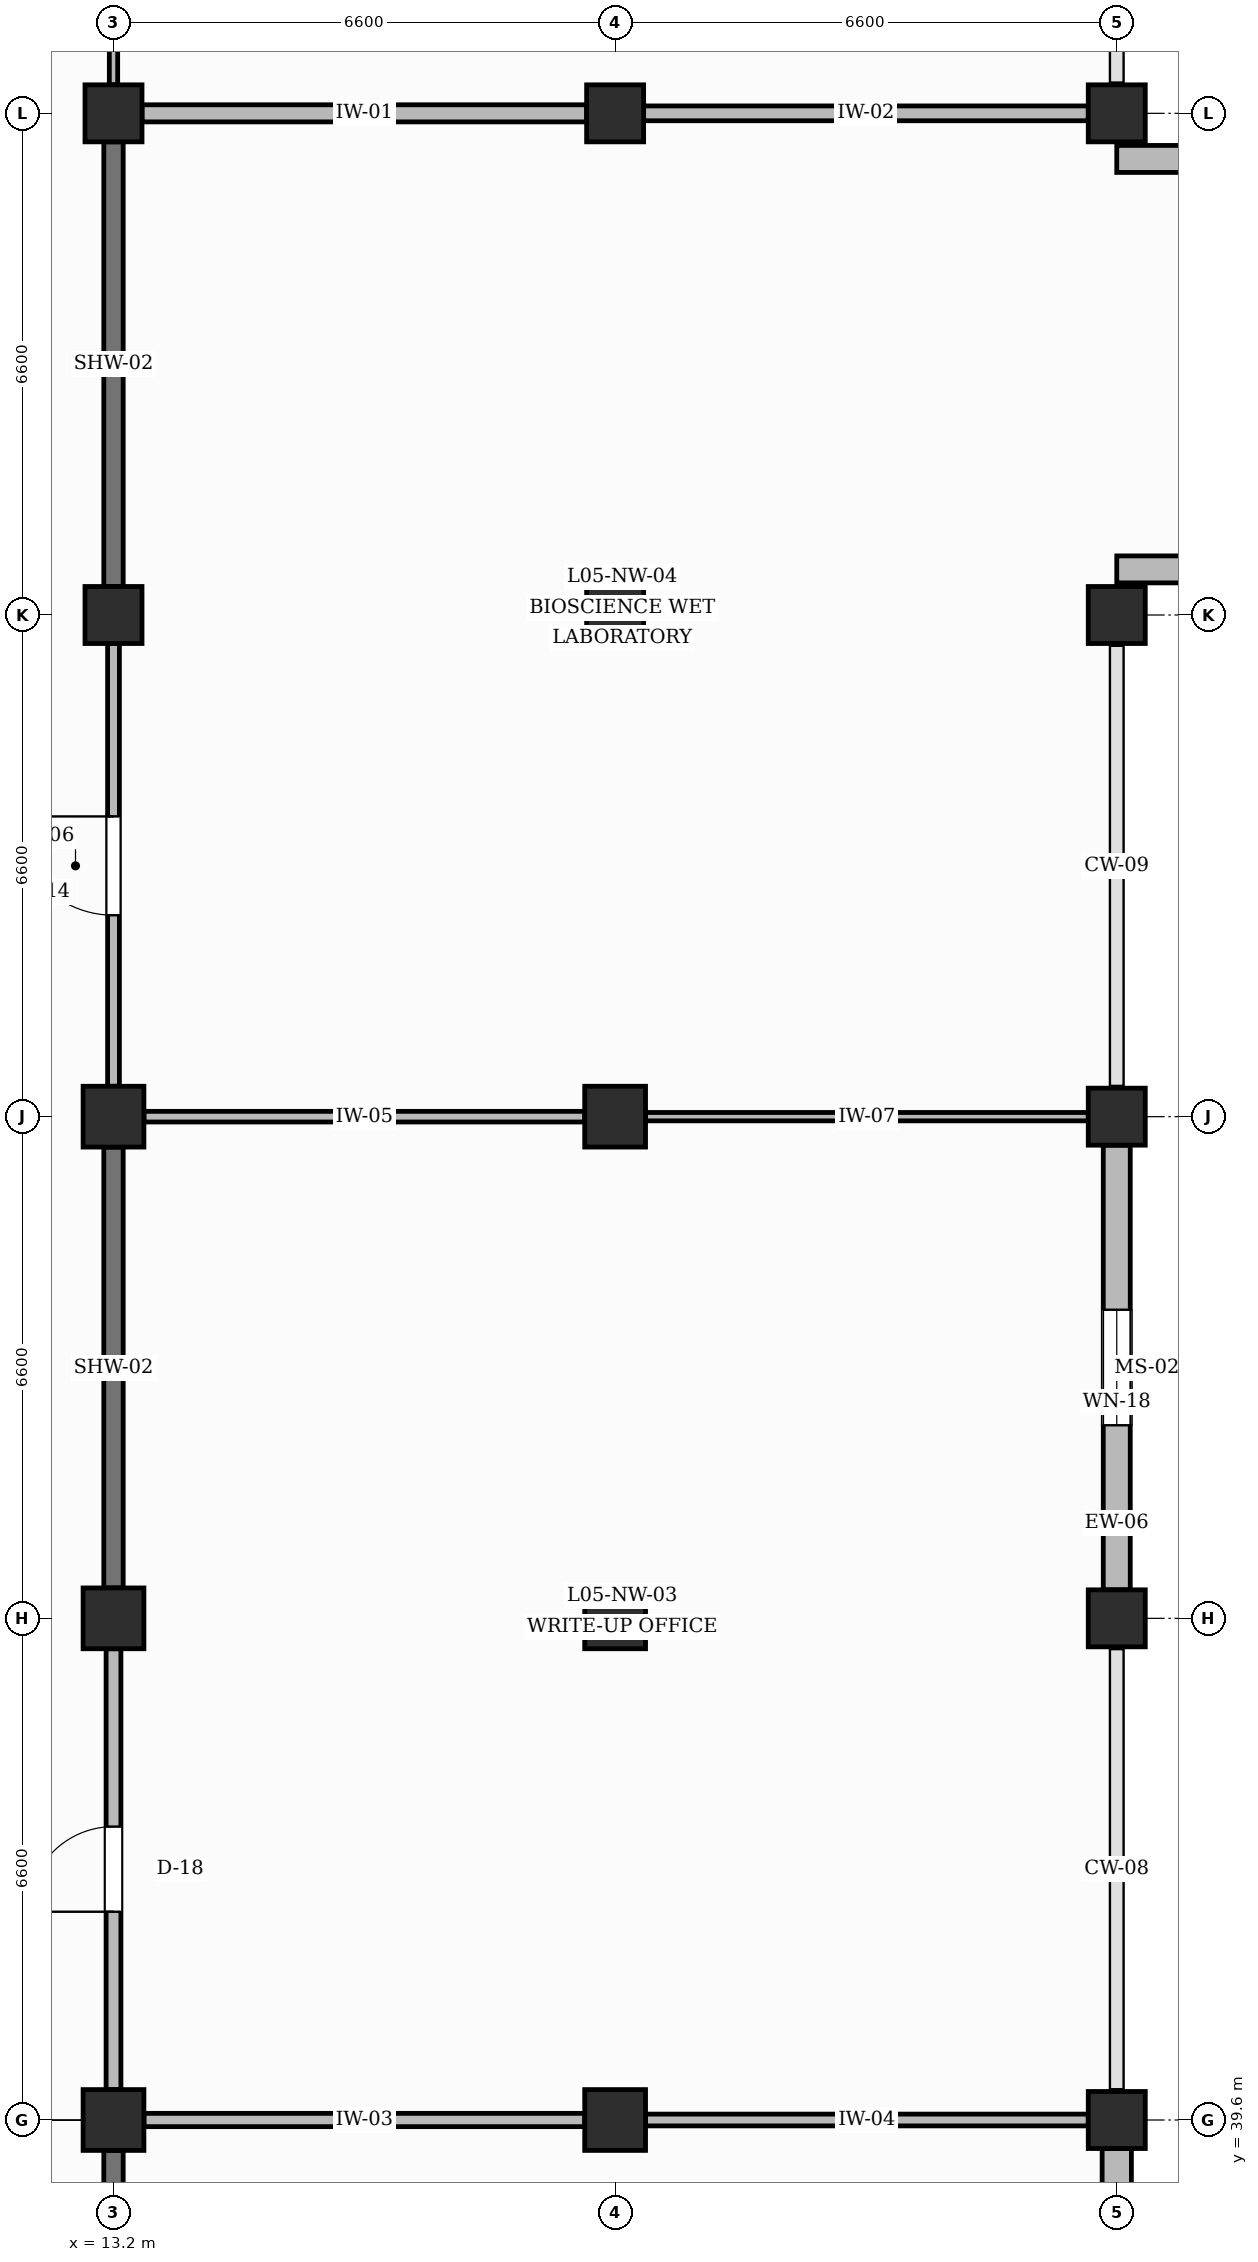
"""IFC4 building model, lengths in metres.
Left out: names, types, materials, properties, quantities, classifications, styles, units other than length and angle.
Written with IfcOpenShell. Run it as: python <this file> out.ifc"""

import sys

from ifc_helpers import new_model, si_unit, direction, frame, frame_2d, origin, origin_2d, place, context, subcontext, project, spatial, rectangle, extrude, element, fill, save


model = new_model("IFC4")
c1 = context("Model", 3, precision=1e-05, world=origin(), true_north=direction((0.0, 1.0)))
c2 = subcontext(c1, "Body", "Model", "MODEL_VIEW")
j1 = project(units=[si_unit("LENGTHUNIT", "METRE"), si_unit("PLANEANGLEUNIT", "RADIAN")], contexts=[c1])
p1 = place(None, origin())
s1 = spatial("IfcSite", under=j1, at=p1, CompositionType="ELEMENT")
p2 = place(p1, origin())
s2 = spatial("IfcBuilding", under=s1, at=p2, CompositionType="ELEMENT")
p3 = place(p2, frame((0.0, 0.0, 22.8)))
s3 = spatial("IfcBuildingStorey", under=s2, at=p3, CompositionType="ELEMENT", Elevation=22.8)
for number, where, z_axis, x_axis in (
    (1, (13.2, 39.6, 0.0), (0.0, 0.0, 1.0), (1.0, 0.0, 0.0)),
    (2, (13.2, 46.2, 0.0), (0.0, 0.0, 1.0), (1.0, 0.0, 0.0)),
    (3, (13.2, 52.8, 0.0), (0.0, 0.0, 1.0), (1.0, 0.0, 0.0)),
):
    element("IfcColumn", number, at=place(p3, frame(where, z_axis=z_axis, x_axis=x_axis)), inside=s3, PredefinedType="COLUMN", context=c2, shape_type="SweptSolid", body=[
        extrude(rectangle(XDim=0.8, YDim=0.8, at=origin_2d()), origin(), (0.0, 0.0, 1.0), 4.2),
    ])
for number, where, z_axis, x_axis in (
    (4, (13.2, 59.4, 0.0), (0.0, 0.0, 1.0), (1.0, 0.0, 0.0)),
    (5, (13.2, 66.0, 0.0), (0.0, 0.0, 1.0), (1.0, 0.0, 0.0)),
):
    element("IfcColumn", number, at=place(p3, frame(where, z_axis=z_axis, x_axis=x_axis)), inside=s3, PredefinedType="COLUMN", context=c2, shape_type="SweptSolid", body=[
        extrude(rectangle(XDim=0.75, YDim=0.75, at=origin_2d()), origin(), (0.0, 0.0, 1.0), 4.2),
    ])
for number, where, z_axis, x_axis in (
    (6, (19.8, 39.6, 0.0), (0.0, 0.0, 1.0), (1.0, 0.0, 0.0)),
    (7, (19.8, 46.2, 0.0), (0.0, 0.0, 1.0), (1.0, 0.0, 0.0)),
    (8, (19.8, 52.8, 0.0), (0.0, 0.0, 1.0), (1.0, 0.0, 0.0)),
):
    element("IfcColumn", number, at=place(p3, frame(where, z_axis=z_axis, x_axis=x_axis)), inside=s3, PredefinedType="COLUMN", context=c2, shape_type="SweptSolid", body=[
        extrude(rectangle(XDim=0.8, YDim=0.8, at=origin_2d()), origin(), (0.0, 0.0, 1.0), 4.2),
    ])
for number, where, z_axis, x_axis in (
    (9, (19.8, 59.4, 0.0), (0.0, 0.0, 1.0), (1.0, 0.0, 0.0)),
    (10, (19.8, 66.0, 0.0), (0.0, 0.0, 1.0), (1.0, 0.0, 0.0)),
    (11, (26.4, 39.6, 0.0), (0.0, 0.0, 1.0), (1.0, 0.0, 0.0)),
    (12, (26.4, 46.2, 0.0), (0.0, 0.0, 1.0), (1.0, 0.0, 0.0)),
    (13, (26.4, 52.8, 0.0), (0.0, 0.0, 1.0), (1.0, 0.0, 0.0)),
    (14, (26.4, 59.4, 0.0), (0.0, 0.0, 1.0), (1.0, 0.0, 0.0)),
    (15, (26.4, 66.0, 0.0), (0.0, 0.0, 1.0), (1.0, 0.0, 0.0)),
):
    element("IfcColumn", number, at=place(p3, frame(where, z_axis=z_axis, x_axis=x_axis)), inside=s3, PredefinedType="COLUMN", context=c2, shape_type="SweptSolid", body=[
        extrude(rectangle(XDim=0.75, YDim=0.75, at=origin_2d()), origin(), (0.0, 0.0, 1.0), 4.2),
    ])
p4 = place(p3, frame((26.4, 33.375, 0.0), z_axis=(0.0, 0.0, 1.0), x_axis=(0.0, 1.0, 0.0)))
e16 = element("IfcWall", 16, at=p4, inside=s3, PredefinedType="SOLIDWALL", context=c2, shape_type="SweptSolid", body=[
    extrude(rectangle(XDim=5.85, YDim=0.385, at=frame_2d((2.925, 0.0))), origin(), (0.0, 0.0, 1.0), 3.27),
])
p5 = place(p4, frame((2.165, 0.0, 0.95)))
e17 = element("IfcOpeningElement", 17, at=p5, cuts=e16, PredefinedType="OPENING", context=c2, shape_type="SweptSolid", body=[
    extrude(rectangle(XDim=1.52, YDim=1.3, at=frame_2d((0.76, 0.65))), frame((0.0, 0.202, 0.0), z_axis=(0.0, -1.0, 0.0), x_axis=(1.0, 0.0, 0.0)), (0.0, 0.0, 1.0), 0.405),
])
p6 = place(p3, frame((26.4, 46.575, 0.0), z_axis=(0.0, 0.0, 1.0), x_axis=(0.0, 1.0, 0.0)))
e18 = element("IfcWall", 18, at=p6, inside=s3, PredefinedType="SOLIDWALL", context=c2, shape_type="SweptSolid", body=[
    extrude(rectangle(XDim=5.85, YDim=0.355, at=frame_2d((2.925, 0.0))), origin(), (0.0, 0.0, 1.0), 3.27),
])
p7 = place(p6, frame((2.165, 0.0, 0.95)))
e19 = element("IfcOpeningElement", 19, at=p7, cuts=e18, PredefinedType="OPENING", context=c2, shape_type="SweptSolid", body=[
    extrude(rectangle(XDim=1.52, YDim=1.52, at=frame_2d((0.76, 0.76))), frame((0.0, 0.188, 0.0), z_axis=(0.0, -1.0, 0.0), x_axis=(1.0, 0.0, 0.0)), (0.0, 0.0, 1.0), 0.375),
])
for number, where, z_axis, x_axis in (
    (20, (26.4, 60.0, 0.0), (0.0, 0.0, 1.0), (1.0, 0.0, 0.0)),
    (21, (26.4, 65.4, 0.0), (0.0, 0.0, 1.0), (1.0, 0.0, 0.0)),
):
    element("IfcWall", number, at=place(p3, frame(where, z_axis=z_axis, x_axis=x_axis)), inside=s3, PredefinedType="SOLIDWALL", context=c2, shape_type="SweptSolid", body=[
        extrude(rectangle(XDim=2.0, YDim=0.355, at=frame_2d((1.0, 0.0))), origin(), (0.0, 0.0, 1.0), 3.27),
    ])
p8 = place(p3, frame((13.2, 33.4, 0.0), z_axis=(0.0, 0.0, 1.0), x_axis=(0.0, 1.0, 0.0)))
e22 = element("IfcWall", 22, at=p8, inside=s3, PredefinedType="SHEAR", context=c2, shape_type="SweptSolid", body=[
    extrude(rectangle(XDim=5.8, YDim=0.255, at=frame_2d((2.9, 0.0))), origin(), (0.0, 0.0, 1.0), 3.17),
])
p9 = place(p3, frame((13.2, 40.0, 0.0), z_axis=(0.0, 0.0, 1.0), x_axis=(0.0, 1.0, 0.0)))
e23 = element("IfcWall", 23, at=p9, inside=s3, PredefinedType="PARTITIONING", context=c2, shape_type="SweptSolid", body=[
    extrude(rectangle(XDim=5.8, YDim=0.195, at=frame_2d((2.9, 0.0))), origin(), (0.0, 0.0, 1.0), 3.17),
])
p10 = place(p9, frame((2.34, 0.0, 0.0)))
e24 = element("IfcOpeningElement", 24, at=p10, cuts=e23, PredefinedType="OPENING", context=c2, shape_type="SweptSolid", body=[
    extrude(rectangle(XDim=1.12, YDim=2.2, at=frame_2d((0.56, 1.1))), frame((0.0, 0.107, 0.0), z_axis=(0.0, -1.0, 0.0), x_axis=(1.0, 0.0, 0.0)), (0.0, 0.0, 1.0), 0.215),
])
p11 = place(p3, frame((13.2, 46.6, 0.0), z_axis=(0.0, 0.0, 1.0), x_axis=(0.0, 1.0, 0.0)))
e25 = element("IfcWall", 25, at=p11, inside=s3, PredefinedType="SHEAR", context=c2, shape_type="SweptSolid", body=[
    extrude(rectangle(XDim=5.8, YDim=0.255, at=frame_2d((2.9, 0.0))), origin(), (0.0, 0.0, 1.0), 3.17),
])
p12 = place(p3, frame((13.2, 53.2, 0.0), z_axis=(0.0, 0.0, 1.0), x_axis=(0.0, 1.0, 0.0)))
e26 = element("IfcWall", 26, at=p12, inside=s3, PredefinedType="PARTITIONING", context=c2, shape_type="SweptSolid", body=[
    extrude(rectangle(XDim=5.825, YDim=0.155, at=frame_2d((2.913, 0.0))), origin(), (0.0, 0.0, 1.0), 3.17),
])
p13 = place(p12, frame((2.25, 0.0, 0.0)))
e27 = element("IfcOpeningElement", 27, at=p13, cuts=e26, PredefinedType="OPENING", context=c2, shape_type="SweptSolid", body=[
    extrude(rectangle(XDim=1.3, YDim=2.3, at=frame_2d((0.65, 1.15))), frame((0.0, 0.087, 0.0), z_axis=(0.0, -1.0, 0.0), x_axis=(1.0, 0.0, 0.0)), (0.0, 0.0, 1.0), 0.175),
])
p14 = place(p3, frame((13.2, 59.775, 0.0), z_axis=(0.0, 0.0, 1.0), x_axis=(0.0, 1.0, 0.0)))
e28 = element("IfcWall", 28, at=p14, inside=s3, PredefinedType="SHEAR", context=c2, shape_type="SweptSolid", body=[
    extrude(rectangle(XDim=5.85, YDim=0.255, at=frame_2d((2.925, 0.0))), origin(), (0.0, 0.0, 1.0), 3.17),
])
p15 = place(p3, frame((13.2, 66.375, 0.0), z_axis=(0.0, 0.0, 1.0), x_axis=(0.0, 1.0, 0.0)))
e29 = element("IfcWall", 29, at=p15, inside=s3, PredefinedType="PARTITIONING", context=c2, shape_type="SweptSolid", body=[
    extrude(rectangle(XDim=5.85, YDim=0.11, at=frame_2d((2.925, 0.0))), origin(), (0.0, 0.0, 1.0), 3.17),
])
p16 = place(p15, frame((2.3, 0.0, 0.0)))
e30 = element("IfcOpeningElement", 30, at=p16, cuts=e29, PredefinedType="OPENING", context=c2, shape_type="SweptSolid", body=[
    extrude(rectangle(XDim=1.25, YDim=2.25, at=frame_2d((0.625, 1.125))), frame((0.0, 0.065, 0.0), z_axis=(0.0, -1.0, 0.0), x_axis=(1.0, 0.0, 0.0)), (0.0, 0.0, 1.0), 0.13),
])
p17 = place(p3, frame((13.6, 39.6, 0.0), z_axis=(0.0, 0.0, 1.0), x_axis=(1.0, 0.0, 0.0)))
e31 = element("IfcWall", 31, at=p17, inside=s3, PredefinedType="PARTITIONING", context=c2, shape_type="SweptSolid", body=[
    extrude(rectangle(XDim=5.8, YDim=0.175, at=frame_2d((2.9, 0.0))), origin(), (0.0, 0.0, 1.0), 3.17),
])
p18 = place(p3, frame((13.6, 52.8, 0.0), z_axis=(0.0, 0.0, 1.0), x_axis=(1.0, 0.0, 0.0)))
e32 = element("IfcWall", 32, at=p18, inside=s3, PredefinedType="PARTITIONING", context=c2, shape_type="SweptSolid", body=[
    extrude(rectangle(XDim=5.8, YDim=0.14, at=frame_2d((2.9, 0.0))), origin(), (0.0, 0.0, 1.0), 3.17),
])
p19 = place(p3, frame((13.575, 66.0, 0.0), z_axis=(0.0, 0.0, 1.0), x_axis=(1.0, 0.0, 0.0)))
e33 = element("IfcWall", 33, at=p19, inside=s3, PredefinedType="PARTITIONING", context=c2, shape_type="SweptSolid", body=[
    extrude(rectangle(XDim=5.85, YDim=0.225, at=frame_2d((2.925, 0.0))), origin(), (0.0, 0.0, 1.0), 3.17),
])
p20 = place(p3, frame((20.2, 39.6, 0.0), z_axis=(0.0, 0.0, 1.0), x_axis=(1.0, 0.0, 0.0)))
e34 = element("IfcWall", 34, at=p20, inside=s3, PredefinedType="PARTITIONING", context=c2, shape_type="SweptSolid", body=[
    extrude(rectangle(XDim=5.825, YDim=0.155, at=frame_2d((2.913, 0.0))), origin(), (0.0, 0.0, 1.0), 3.42),
])
p21 = place(p3, frame((20.2, 52.8, 0.0), z_axis=(0.0, 0.0, 1.0), x_axis=(1.0, 0.0, 0.0)))
e35 = element("IfcWall", 35, at=p21, inside=s3, PredefinedType="PARTITIONING", context=c2, shape_type="SweptSolid", body=[
    extrude(rectangle(XDim=5.825, YDim=0.11, at=frame_2d((2.913, 0.0))), origin(), (0.0, 0.0, 1.0), 3.17),
])
p22 = place(p3, frame((20.175, 66.0, 0.0), z_axis=(0.0, 0.0, 1.0), x_axis=(1.0, 0.0, 0.0)))
e36 = element("IfcWall", 36, at=p22, inside=s3, PredefinedType="PARTITIONING", context=c2, shape_type="SweptSolid", body=[
    extrude(rectangle(XDim=5.85, YDim=0.195, at=frame_2d((2.925, 0.0))), origin(), (0.0, 0.0, 1.0), 3.42),
])
p23 = place(p7, origin())
e37 = element("IfcWindow", 37, at=p23, inside=s3, PartitioningType="DOUBLE_PANEL_VERTICAL", PredefinedType="WINDOW", context=c2, shape_type="SweptSolid", body=[
    extrude(rectangle(XDim=1.52, YDim=1.52, at=frame_2d((0.76, 0.76))), frame((0.0, 0.03, 0.0), z_axis=(0.0, -1.0, 0.0), x_axis=(1.0, 0.0, 0.0)), (0.0, 0.0, 1.0), 0.06),
])
fill(e19, e37)
p24 = place(p10, origin())
e38 = element("IfcDoor", 38, at=p24, inside=s3, OperationType="SINGLE_SWING_LEFT", PredefinedType="DOOR", context=c2, shape_type="SweptSolid", body=[
    extrude(rectangle(XDim=1.12, YDim=2.2, at=frame_2d((0.56, 1.1))), frame((0.0, 0.025, 0.0), z_axis=(0.0, -1.0, 0.0), x_axis=(1.0, 0.0, 0.0)), (0.0, 0.0, 1.0), 0.05),
])
fill(e24, e38)
p25 = place(p13, origin())
e39 = element("IfcDoor", 39, at=p25, inside=s3, OperationType="SINGLE_SWING_RIGHT", PredefinedType="DOOR", context=c2, shape_type="SweptSolid", body=[
    extrude(rectangle(XDim=1.3, YDim=2.3, at=frame_2d((0.65, 1.15))), frame((0.0, 0.025, 0.0), z_axis=(0.0, -1.0, 0.0), x_axis=(1.0, 0.0, 0.0)), (0.0, 0.0, 1.0), 0.05),
])
fill(e27, e39)
save(model, sys.argv[1])
